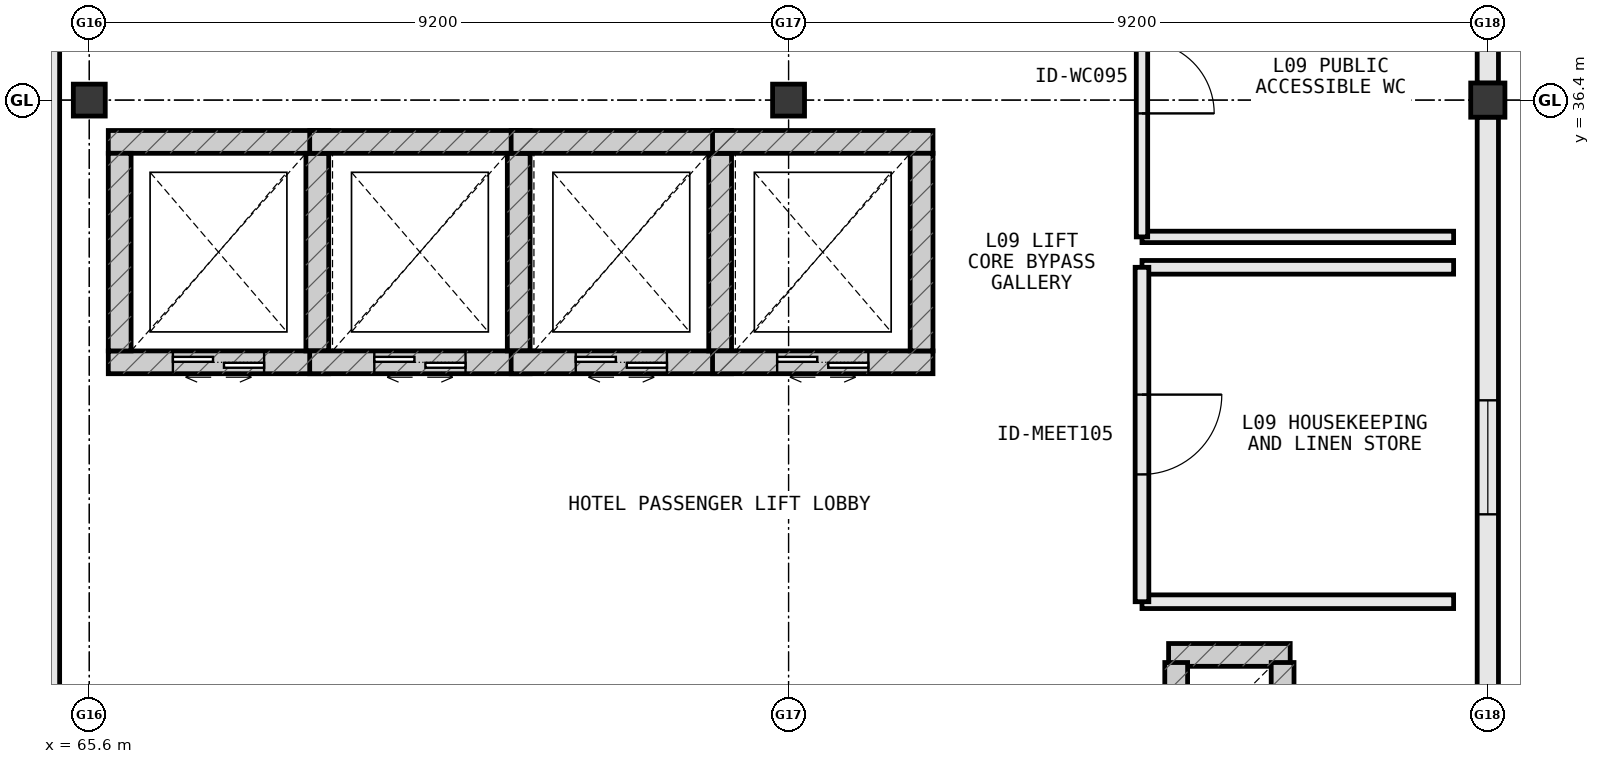
"""IFC4 building model, lengths in metres.
Left out: names, types, materials, properties, quantities, classifications, styles, units other than length and angle.
Written with IfcOpenShell. Run it as: python <this file> out.ifc"""

import sys

from ifc_helpers import new_model, si_unit, direction, frame, frame_2d, origin, origin_2d, place, context, subcontext, project, spatial, rectangle, extrude, element, fill, save


model = new_model("IFC4")
c1 = context("Model", 3, precision=1e-05, world=origin(), true_north=direction((0.0, 1.0)))
c2 = subcontext(c1, "Body", "Model", "MODEL_VIEW")
j1 = project(units=[si_unit("LENGTHUNIT", "METRE"), si_unit("PLANEANGLEUNIT", "RADIAN")], contexts=[c1])
p1 = place(None, origin())
s1 = spatial("IfcSite", under=j1, at=p1, CompositionType="ELEMENT")
p2 = place(p1, origin())
s2 = spatial("IfcBuilding", under=s1, at=p2, CompositionType="ELEMENT")
p3 = place(p2, frame((0.0, 0.0, 39.0)))
s3 = spatial("IfcBuildingStorey", under=s2, at=p3, CompositionType="ELEMENT", Elevation=39.0)
p4 = place(p3, frame((74.8, 36.4, 0.0), z_axis=(0.0, 0.0, 1.0), x_axis=(1.0, 0.0, 0.0)))
e1 = element("IfcColumn", 1, at=p4, inside=s3, PredefinedType="COLUMN", context=c2, shape_type="SweptSolid", body=[
    extrude(rectangle(XDim=0.42, YDim=0.42, at=origin_2d()), origin(), (0.0, 0.0, 1.0), 3.8),
])
p5 = place(p3, frame((84.0, 36.4, 0.0), z_axis=(0.0, 0.0, 1.0), x_axis=(1.0, 0.0, 0.0)))
e2 = element("IfcColumn", 2, at=p5, inside=s3, PredefinedType="COLUMN", context=c2, shape_type="SweptSolid", body=[
    extrude(rectangle(XDim=0.45, YDim=0.45, at=origin_2d()), origin(), (0.0, 0.0, 1.0), 3.8),
])
p6 = place(p3, frame((65.6, 36.4, 0.0), z_axis=(0.0, 0.0, 1.0), x_axis=(1.0, 0.0, 0.0)))
e3 = element("IfcColumn", 3, at=p6, inside=s3, PredefinedType="COLUMN", context=c2, shape_type="SweptSolid", body=[
    extrude(rectangle(XDim=0.42, YDim=0.42, at=origin_2d()), origin(), (0.0, 0.0, 1.0), 3.8),
])
p7 = place(p3, frame((81.4, 29.1, 0.0), z_axis=(0.0, 0.0, 1.0), x_axis=(-1.0, 0.0, 0.0)))
e4 = element("IfcWall", 4, at=p7, inside=s3, PredefinedType="SHEAR", context=c2, shape_type="SweptSolid", body=[
    extrude(rectangle(XDim=1.6, YDim=0.3, at=frame_2d((0.8, 0.0))), origin(), (0.0, 0.0, 1.0), 3.565),
])
for number, where, z_axis, x_axis in (
    (5, (79.9, 29.0, 0.0), (0.0, 0.0, 1.0), (0.0, -1.0, 0.0)),
    (6, (81.3, 27.8, 0.0), (0.0, 0.0, 1.0), (0.0, 1.0, 0.0)),
):
    element("IfcWall", number, at=place(p3, frame(where, z_axis=z_axis, x_axis=x_axis)), inside=s3, PredefinedType="SHEAR", context=c2, shape_type="SweptSolid", body=[
        extrude(rectangle(XDim=1.2, YDim=0.3, at=frame_2d((0.6, 0.0))), origin(), (0.0, 0.0, 1.0), 3.565),
    ])
p8 = place(p3, frame((84.0, 27.223, 0.0), z_axis=(0.0, 0.0, 1.0), x_axis=(0.0, 1.0, 0.0)))
e7 = element("IfcWall", 7, at=p8, inside=s3, PredefinedType="STANDARD", context=c2, shape_type="SweptSolid", body=[
    extrude(rectangle(XDim=8.954, YDim=0.28, at=frame_2d((4.477, 0.0))), origin(), (0.0, 0.0, 1.0), 2.98),
])
p9 = place(p8, frame((3.727, 0.0, 0.85)))
e8 = element("IfcOpeningElement", 8, at=p9, cuts=e7, PredefinedType="OPENING", context=c2, shape_type="SweptSolid", body=[
    extrude(rectangle(XDim=1.5, YDim=1.75, at=frame_2d((0.75, 0.875))), frame((0.0, 0.152, 0.0), z_axis=(0.0, -1.0, 0.0), x_axis=(1.0, 0.0, 0.0)), (0.0, 0.0, 1.0), 0.304),
])
p10 = place(p3, frame((84.0, 36.623, 0.0), z_axis=(0.0, 0.0, 1.0), x_axis=(0.0, 1.0, 0.0)))
e9 = element("IfcWall", 9, at=p10, inside=s3, PredefinedType="STANDARD", context=c2, shape_type="SweptSolid", body=[
    extrude(rectangle(XDim=10.354, YDim=0.28, at=frame_2d((5.177, 0.0))), origin(), (0.0, 0.0, 1.0), 2.98),
])
p11 = place(p10, frame((7.015, 0.0, 0.85)))
e10 = element("IfcOpeningElement", 10, at=p11, cuts=e9, PredefinedType="OPENING", context=c2, shape_type="SweptSolid", body=[
    extrude(rectangle(XDim=1.5, YDim=1.75, at=frame_2d((0.75, 0.875))), frame((0.0, 0.152, 0.0), z_axis=(0.0, -1.0, 0.0), x_axis=(1.0, 0.0, 0.0)), (0.0, 0.0, 1.0), 0.304),
])
p12 = place(p3, frame((65.85, 32.95, 0.0), z_axis=(0.0, 0.0, 1.0), x_axis=(1.0, 0.0, 0.0)))
e11 = element("IfcWall", 11, at=p12, inside=s3, PredefinedType="SHEAR", context=c2, shape_type="SweptSolid", body=[
    extrude(rectangle(XDim=2.9, YDim=0.3, at=frame_2d((1.45, 0.0))), origin(), (0.0, 0.0, 1.0), 3.8),
])
p13 = place(p12, frame((0.85, 0.0, 0.0)))
e12 = element("IfcOpeningElement", 12, at=p13, cuts=e11, PredefinedType="OPENING", context=c2, shape_type="SweptSolid", body=[
    extrude(rectangle(XDim=1.2, YDim=2.2, at=frame_2d((0.6, 1.1))), frame((0.0, 0.162, 0.0), z_axis=(0.0, -1.0, 0.0), x_axis=(1.0, 0.0, 0.0)), (0.0, 0.0, 1.0), 0.324),
])
p14 = place(p3, frame((68.75, 35.85, 0.0), z_axis=(0.0, 0.0, 1.0), x_axis=(-1.0, 0.0, 0.0)))
e13 = element("IfcWall", 13, at=p14, inside=s3, PredefinedType="SHEAR", context=c2, shape_type="SweptSolid", body=[
    extrude(rectangle(XDim=2.9, YDim=0.3, at=frame_2d((1.45, 0.0))), origin(), (0.0, 0.0, 1.0), 3.8),
])
for number, where, z_axis, x_axis in (
    (14, (68.6, 33.1, 0.0), (0.0, 0.0, 1.0), (0.0, 1.0, 0.0)),
    (15, (66.0, 35.7, 0.0), (0.0, 0.0, 1.0), (0.0, -1.0, 0.0)),
):
    element("IfcWall", number, at=place(p3, frame(where, z_axis=z_axis, x_axis=x_axis)), inside=s3, PredefinedType="SHEAR", context=c2, shape_type="SweptSolid", body=[
        extrude(rectangle(XDim=2.6, YDim=0.3, at=frame_2d((1.3, 0.0))), origin(), (0.0, 0.0, 1.0), 3.8),
    ])
p15 = place(p3, frame((68.5, 32.95, 0.0), z_axis=(0.0, 0.0, 1.0), x_axis=(1.0, 0.0, 0.0)))
e16 = element("IfcWall", 16, at=p15, inside=s3, PredefinedType="SHEAR", context=c2, shape_type="SweptSolid", body=[
    extrude(rectangle(XDim=2.9, YDim=0.3, at=frame_2d((1.45, 0.0))), origin(), (0.0, 0.0, 1.0), 3.8),
])
p16 = place(p15, frame((0.85, 0.0, 0.0)))
e17 = element("IfcOpeningElement", 17, at=p16, cuts=e16, PredefinedType="OPENING", context=c2, shape_type="SweptSolid", body=[
    extrude(rectangle(XDim=1.2, YDim=2.2, at=frame_2d((0.6, 1.1))), frame((0.0, 0.162, 0.0), z_axis=(0.0, -1.0, 0.0), x_axis=(1.0, 0.0, 0.0)), (0.0, 0.0, 1.0), 0.324),
])
p17 = place(p3, frame((71.4, 35.85, 0.0), z_axis=(0.0, 0.0, 1.0), x_axis=(-1.0, 0.0, 0.0)))
e18 = element("IfcWall", 18, at=p17, inside=s3, PredefinedType="SHEAR", context=c2, shape_type="SweptSolid", body=[
    extrude(rectangle(XDim=2.9, YDim=0.3, at=frame_2d((1.45, 0.0))), origin(), (0.0, 0.0, 1.0), 3.8),
])
p18 = place(p3, frame((71.25, 33.1, 0.0), z_axis=(0.0, 0.0, 1.0), x_axis=(0.0, 1.0, 0.0)))
e19 = element("IfcWall", 19, at=p18, inside=s3, PredefinedType="SHEAR", context=c2, shape_type="SweptSolid", body=[
    extrude(rectangle(XDim=2.6, YDim=0.3, at=frame_2d((1.3, 0.0))), origin(), (0.0, 0.0, 1.0), 3.8),
])
p19 = place(p3, frame((71.15, 32.95, 0.0), z_axis=(0.0, 0.0, 1.0), x_axis=(1.0, 0.0, 0.0)))
e20 = element("IfcWall", 20, at=p19, inside=s3, PredefinedType="SHEAR", context=c2, shape_type="SweptSolid", body=[
    extrude(rectangle(XDim=2.9, YDim=0.3, at=frame_2d((1.45, 0.0))), origin(), (0.0, 0.0, 1.0), 3.8),
])
p20 = place(p19, frame((0.85, 0.0, 0.0)))
e21 = element("IfcOpeningElement", 21, at=p20, cuts=e20, PredefinedType="OPENING", context=c2, shape_type="SweptSolid", body=[
    extrude(rectangle(XDim=1.2, YDim=2.2, at=frame_2d((0.6, 1.1))), frame((0.0, 0.162, 0.0), z_axis=(0.0, -1.0, 0.0), x_axis=(1.0, 0.0, 0.0)), (0.0, 0.0, 1.0), 0.324),
])
p21 = place(p3, frame((74.05, 35.85, 0.0), z_axis=(0.0, 0.0, 1.0), x_axis=(-1.0, 0.0, 0.0)))
e22 = element("IfcWall", 22, at=p21, inside=s3, PredefinedType="SHEAR", context=c2, shape_type="SweptSolid", body=[
    extrude(rectangle(XDim=2.9, YDim=0.3, at=frame_2d((1.45, 0.0))), origin(), (0.0, 0.0, 1.0), 3.8),
])
p22 = place(p3, frame((73.9, 33.1, 0.0), z_axis=(0.0, 0.0, 1.0), x_axis=(0.0, 1.0, 0.0)))
e23 = element("IfcWall", 23, at=p22, inside=s3, PredefinedType="SHEAR", context=c2, shape_type="SweptSolid", body=[
    extrude(rectangle(XDim=2.6, YDim=0.3, at=frame_2d((1.3, 0.0))), origin(), (0.0, 0.0, 1.0), 3.8),
])
p23 = place(p3, frame((73.8, 32.95, 0.0), z_axis=(0.0, 0.0, 1.0), x_axis=(1.0, 0.0, 0.0)))
e24 = element("IfcWall", 24, at=p23, inside=s3, PredefinedType="SHEAR", context=c2, shape_type="SweptSolid", body=[
    extrude(rectangle(XDim=2.9, YDim=0.3, at=frame_2d((1.45, 0.0))), origin(), (0.0, 0.0, 1.0), 3.8),
])
p24 = place(p23, frame((0.85, 0.0, 0.0)))
e25 = element("IfcOpeningElement", 25, at=p24, cuts=e24, PredefinedType="OPENING", context=c2, shape_type="SweptSolid", body=[
    extrude(rectangle(XDim=1.2, YDim=2.2, at=frame_2d((0.6, 1.1))), frame((0.0, 0.162, 0.0), z_axis=(0.0, -1.0, 0.0), x_axis=(1.0, 0.0, 0.0)), (0.0, 0.0, 1.0), 0.324),
])
p25 = place(p3, frame((76.7, 35.85, 0.0), z_axis=(0.0, 0.0, 1.0), x_axis=(-1.0, 0.0, 0.0)))
e26 = element("IfcWall", 26, at=p25, inside=s3, PredefinedType="SHEAR", context=c2, shape_type="SweptSolid", body=[
    extrude(rectangle(XDim=2.9, YDim=0.3, at=frame_2d((1.45, 0.0))), origin(), (0.0, 0.0, 1.0), 3.8),
])
p26 = place(p3, frame((76.55, 33.1, 0.0), z_axis=(0.0, 0.0, 1.0), x_axis=(0.0, 1.0, 0.0)))
e27 = element("IfcWall", 27, at=p26, inside=s3, PredefinedType="SHEAR", context=c2, shape_type="SweptSolid", body=[
    extrude(rectangle(XDim=2.6, YDim=0.3, at=frame_2d((1.3, 0.0))), origin(), (0.0, 0.0, 1.0), 3.8),
])
for number, where, z_axis, x_axis in (
    (28, (79.45, 29.8, 0.0), (0.0, 0.0, 1.0), (1.0, 0.0, 0.0)),
    (29, (83.55, 34.2, 0.0), (0.0, 0.0, 1.0), (-1.0, 0.0, 0.0)),
):
    element("IfcWall", number, at=place(p3, frame(where, z_axis=z_axis, x_axis=x_axis)), inside=s3, PredefinedType="PARTITIONING", context=c2, shape_type="SweptSolid", body=[
        extrude(rectangle(XDim=4.1, YDim=0.18, at=frame_2d((2.05, 0.0))), origin(), (0.0, 0.0, 1.0), 3.565),
    ])
p27 = place(p3, frame((79.45, 34.2, 0.0), z_axis=(0.0, 0.0, 1.0), x_axis=(0.0, -1.0, 0.0)))
e30 = element("IfcWall", 30, at=p27, inside=s3, PredefinedType="PARTITIONING", context=c2, shape_type="SweptSolid", body=[
    extrude(rectangle(XDim=4.4, YDim=0.18, at=frame_2d((2.2, 0.0))), origin(), (0.0, 0.0, 1.0), 3.565),
])
p28 = place(p27, frame((1.675, 0.0, 0.0)))
e31 = element("IfcOpeningElement", 31, at=p28, cuts=e30, PredefinedType="OPENING", context=c2, shape_type="SweptSolid", body=[
    extrude(rectangle(XDim=1.05, YDim=2.2, at=frame_2d((0.525, 1.1))), frame((0.0, 0.102, 0.0), z_axis=(0.0, -1.0, 0.0), x_axis=(1.0, 0.0, 0.0)), (0.0, 0.0, 1.0), 0.204),
])
p29 = place(p3, frame((79.45, 34.6, 0.0), z_axis=(0.0, 0.0, 1.0), x_axis=(1.0, 0.0, 0.0)))
e32 = element("IfcWall", 32, at=p29, inside=s3, PredefinedType="PLUMBINGWALL", context=c2, shape_type="SweptSolid", body=[
    extrude(rectangle(XDim=4.1, YDim=0.15, at=frame_2d((2.05, 0.0))), origin(), (0.0, 0.0, 1.0), 3.565),
])
p30 = place(p3, frame((79.45, 38.8, 0.0), z_axis=(0.0, 0.0, 1.0), x_axis=(0.0, -1.0, 0.0)))
e33 = element("IfcWall", 33, at=p30, inside=s3, PredefinedType="PLUMBINGWALL", context=c2, shape_type="SweptSolid", body=[
    extrude(rectangle(XDim=4.2, YDim=0.15, at=frame_2d((2.1, 0.0))), origin(), (0.0, 0.0, 1.0), 3.565),
])
p31 = place(p30, frame((1.625, 0.0, 0.0)))
e34 = element("IfcOpeningElement", 34, at=p31, cuts=e33, PredefinedType="OPENING", context=c2, shape_type="SweptSolid", body=[
    extrude(rectangle(XDim=0.95, YDim=2.15, at=frame_2d((0.475, 1.075))), frame((0.0, 0.087, 0.0), z_axis=(0.0, -1.0, 0.0), x_axis=(1.0, 0.0, 0.0)), (0.0, 0.0, 1.0), 0.174),
])
p32 = place(p3, frame((65.13, 27.16, 0.0), z_axis=(0.0, 0.0, 1.0), x_axis=(0.0, 1.0, 0.0)))
e35 = element("IfcWall", 35, at=p32, inside=s3, PredefinedType="PARTITIONING", context=c2, shape_type="SweptSolid", body=[
    extrude(rectangle(XDim=10.34, YDim=0.16, at=frame_2d((5.17, 0.0))), origin(), (0.0, 0.0, 1.0), 3.565),
])
p33 = place(p9, origin())
e36 = element("IfcWindow", 36, at=p33, inside=s3, PartitioningType="SINGLE_PANEL", PredefinedType="WINDOW", context=c2, shape_type="SweptSolid", body=[
    extrude(rectangle(XDim=1.5, YDim=1.75, at=frame_2d((0.75, 0.875))), frame((0.0, 0.03, 0.0), z_axis=(0.0, -1.0, 0.0), x_axis=(1.0, 0.0, 0.0)), (0.0, 0.0, 1.0), 0.06),
])
fill(e8, e36)
p34 = place(p13, origin())
e37 = element("IfcDoor", 37, at=p34, inside=s3, OperationType="DOUBLE_DOOR_SLIDING", PredefinedType="DOOR", context=c2, shape_type="SweptSolid", body=[
    extrude(rectangle(XDim=1.2, YDim=2.2, at=frame_2d((0.6, 1.1))), frame((0.0, 0.025, 0.0), z_axis=(0.0, -1.0, 0.0), x_axis=(1.0, 0.0, 0.0)), (0.0, 0.0, 1.0), 0.05),
])
fill(e12, e37)
p35 = place(p16, origin())
e38 = element("IfcDoor", 38, at=p35, inside=s3, OperationType="DOUBLE_DOOR_SLIDING", PredefinedType="DOOR", context=c2, shape_type="SweptSolid", body=[
    extrude(rectangle(XDim=1.2, YDim=2.2, at=frame_2d((0.6, 1.1))), frame((0.0, 0.025, 0.0), z_axis=(0.0, -1.0, 0.0), x_axis=(1.0, 0.0, 0.0)), (0.0, 0.0, 1.0), 0.05),
])
fill(e17, e38)
p36 = place(p20, origin())
e39 = element("IfcDoor", 39, at=p36, inside=s3, OperationType="DOUBLE_DOOR_SLIDING", PredefinedType="DOOR", context=c2, shape_type="SweptSolid", body=[
    extrude(rectangle(XDim=1.2, YDim=2.2, at=frame_2d((0.6, 1.1))), frame((0.0, 0.025, 0.0), z_axis=(0.0, -1.0, 0.0), x_axis=(1.0, 0.0, 0.0)), (0.0, 0.0, 1.0), 0.05),
])
fill(e21, e39)
p37 = place(p24, origin())
e40 = element("IfcDoor", 40, at=p37, inside=s3, OperationType="DOUBLE_DOOR_SLIDING", PredefinedType="DOOR", context=c2, shape_type="SweptSolid", body=[
    extrude(rectangle(XDim=1.2, YDim=2.2, at=frame_2d((0.6, 1.1))), frame((0.0, 0.025, 0.0), z_axis=(0.0, -1.0, 0.0), x_axis=(1.0, 0.0, 0.0)), (0.0, 0.0, 1.0), 0.05),
])
fill(e25, e40)
p38 = place(p28, origin())
e41 = element("IfcDoor", 41, at=p38, inside=s3, OperationType="SINGLE_SWING_LEFT", PredefinedType="DOOR", context=c2, shape_type="SweptSolid", body=[
    extrude(rectangle(XDim=1.05, YDim=2.2, at=frame_2d((0.525, 1.1))), frame((0.0, 0.025, 0.0), z_axis=(0.0, -1.0, 0.0), x_axis=(1.0, 0.0, 0.0)), (0.0, 0.0, 1.0), 0.05),
])
fill(e31, e41)
p39 = place(p31, origin())
e42 = element("IfcDoor", 42, at=p39, inside=s3, OperationType="SINGLE_SWING_RIGHT", PredefinedType="DOOR", context=c2, shape_type="SweptSolid", body=[
    extrude(rectangle(XDim=0.95, YDim=2.15, at=frame_2d((0.475, 1.075))), frame((0.0, 0.025, 0.0), z_axis=(0.0, -1.0, 0.0), x_axis=(1.0, 0.0, 0.0)), (0.0, 0.0, 1.0), 0.05),
])
fill(e34, e42)
save(model, sys.argv[1])
